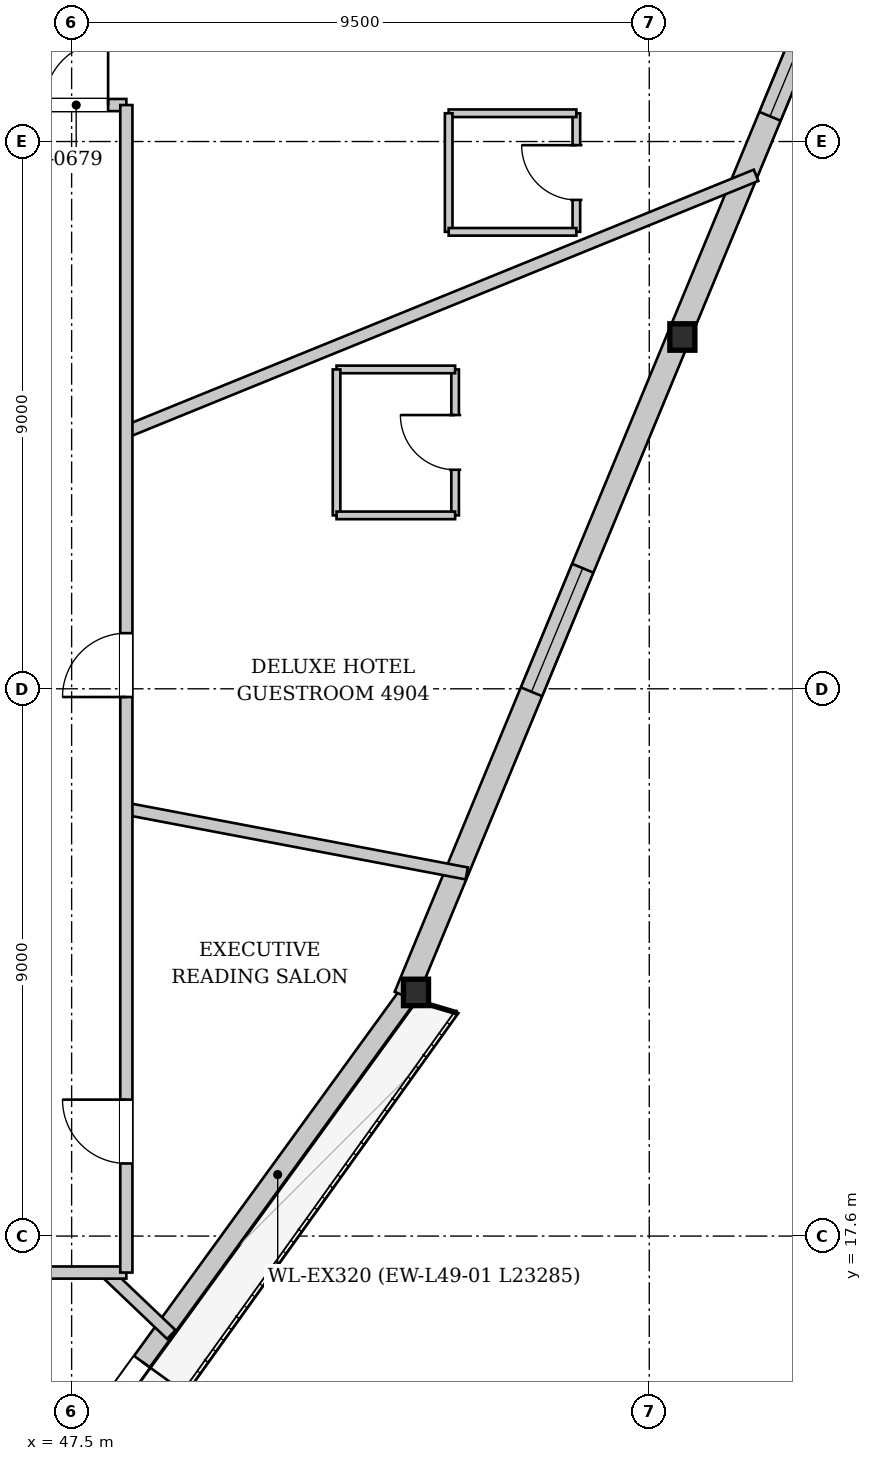
"""IFC4 building model, lengths in metres.
Left out: names, types, materials, properties, quantities, classifications, styles, units other than length and angle.
Written with IfcOpenShell. Run it as: python <this file> out.ifc"""

import sys

from ifc_helpers import new_model, si_unit, direction, frame, frame_2d, origin, origin_2d, place, context, subcontext, project, spatial, rectangle, i_section, extrude, source, transform, mapped, element, fill, save


model = new_model("IFC4")
c1 = context("Model", 3, precision=1e-05, world=origin(), true_north=direction((0.0, 1.0)))
c2 = subcontext(c1, "Body", "Model", "MODEL_VIEW")
j1 = project(units=[si_unit("LENGTHUNIT", "METRE"), si_unit("PLANEANGLEUNIT", "RADIAN")], contexts=[c1])
p1 = place(None, origin())
s1 = spatial("IfcSite", under=j1, at=p1, CompositionType="ELEMENT")
p2 = place(p1, origin())
s2 = spatial("IfcBuilding", under=s1, at=p2, CompositionType="ELEMENT")
p3 = place(p2, frame((0.0, 0.0, 185.65)))
s3 = spatial("IfcBuildingStorey", under=s2, at=p3, CompositionType="ELEMENT", Elevation=185.65)
m1 = source(origin(), c2, "Body", "SweptSolid", [
    extrude(i_section(OverallWidth=0.412, OverallDepth=0.435, WebThickness=0.031, FlangeThickness=0.05, at=origin_2d()), origin(), (0.0, 0.0, 1.0), 3.396),
])
p4 = place(p3, frame((53.164, 21.471, 0.0), z_axis=(0.0, 0.080230966511, 0.996776299885), x_axis=(-1.0, 0.0, 0.0)))
e1 = element("IfcColumn", 1, at=p4, inside=s3, PredefinedType="COLUMN", context=c2, shape_type="MappedRepresentation", body=[
    mapped(m1, transform((0.0, 0.0, 0.0), x_axis=(1.0, 0.0, 0.0), y_axis=(0.0, 1.0, 0.0), z_axis=(0.0, 0.0, 1.0), scale=1.0)),
])
m2 = source(origin(), c2, "Body", "SweptSolid", [
    extrude(i_section(OverallWidth=0.412, OverallDepth=0.435, WebThickness=0.031, FlangeThickness=0.05, at=origin_2d()), origin(), (0.0, 0.0, 1.0), 3.403),
])
p5 = place(p3, frame((57.621, 32.226, 0.0), z_axis=(-0.045049424917, 0.093470383228, 0.99460235108), x_axis=(-0.900831457079, -0.434168960127, 0.0)))
e2 = element("IfcColumn", 2, at=p5, inside=s3, PredefinedType="COLUMN", context=c2, shape_type="MappedRepresentation", body=[
    mapped(m2, transform((0.0, 0.0, 0.0), x_axis=(1.0, 0.0, 0.0), y_axis=(0.0, 1.0, 0.0), z_axis=(0.0, 0.0, 1.0), scale=1.0)),
])
p6 = place(p3, frame((53.034, 21.565, 0.0), z_axis=(0.0, 0.0, 1.0), x_axis=(-0.58764790483, -0.809116765337, 0.0)))
e3 = element("IfcWall", 3, at=p6, inside=s3, PredefinedType="SOLIDWALL", context=c2, shape_type="SweptSolid", body=[
    extrude(rectangle(XDim=23.285, YDim=0.32, at=frame_2d((11.643, 0.0))), origin(), (0.0, 0.0, 1.0), 2.722),
])
p7 = place(p6, frame((7.451, 0.0, 0.0)))
e4 = element("IfcOpeningElement", 4, at=p7, cuts=e3, PredefinedType="OPENING", context=c2, shape_type="SweptSolid", body=[
    extrude(rectangle(XDim=1.5, YDim=2.3, at=frame_2d((0.75, 1.15))), frame((0.0, 0.17, 0.0), z_axis=(0.0, -1.0, 0.0), x_axis=(1.0, 0.0, 0.0)), (0.0, 0.0, 1.0), 0.34),
])
p8 = place(p6, frame((14.331, 0.0, 0.252)))
e5 = element("IfcOpeningElement", 5, at=p8, cuts=e3, PredefinedType="OPENING", context=c2, shape_type="SweptSolid", body=[
    extrude(rectangle(XDim=2.6, YDim=2.35, at=frame_2d((1.3, 1.175))), frame((0.0, 0.17, 0.0), z_axis=(0.0, -1.0, 0.0), x_axis=(1.0, 0.0, 0.0)), (0.0, 0.0, 1.0), 0.34),
])
p9 = place(p3, frame((61.903, 43.055, 0.0), z_axis=(0.0, 0.0, 1.0), x_axis=(-0.382868163496, -0.923802992732, 0.0)))
e6 = element("IfcWall", 6, at=p9, inside=s3, PredefinedType="SOLIDWALL", context=c2, shape_type="SweptSolid", body=[
    extrude(rectangle(XDim=23.285, YDim=0.38, at=frame_2d((11.643, 0.0))), origin(), (0.0, 0.0, 1.0), 2.722),
])
p10 = place(p9, frame((5.42, 0.0, 0.352)))
e7 = element("IfcOpeningElement", 7, at=p10, cuts=e6, PredefinedType="OPENING", context=c2, shape_type="SweptSolid", body=[
    extrude(rectangle(XDim=2.2, YDim=2.25, at=frame_2d((1.1, 1.125))), frame((0.0, 0.2, 0.0), z_axis=(0.0, -1.0, 0.0), x_axis=(1.0, 0.0, 0.0)), (0.0, 0.0, 1.0), 0.4),
])
p11 = place(p9, frame((15.665, 0.0, 0.352)))
e8 = element("IfcOpeningElement", 8, at=p11, cuts=e6, PredefinedType="OPENING", context=c2, shape_type="SweptSolid", body=[
    extrude(rectangle(XDim=2.2, YDim=2.25, at=frame_2d((1.1, 1.125))), frame((0.0, 0.2, 0.0), z_axis=(0.0, -1.0, 0.0), x_axis=(1.0, 0.0, 0.0)), (0.0, 0.0, 1.0), 0.4),
])
p12 = place(p3, frame((48.07, 17.0, 0.0), z_axis=(0.0, 0.0, 1.0), x_axis=(0.723764420098, -0.69004714636, 0.0)))
e9 = element("IfcWall", 9, at=p12, inside=s3, PredefinedType="PARTITIONING", context=c2, shape_type="SweptSolid", body=[
    extrude(rectangle(XDim=1.477, YDim=0.2, at=frame_2d((0.739, 0.0))), origin(), (0.0, 0.0, 1.0), 3.33),
])
p13 = place(p3, frame((48.4, 24.626, 0.0), z_axis=(0.0, 0.0, 1.0), x_axis=(0.982464340051, -0.186450584681, 0.0)))
e10 = element("IfcWall", 10, at=p13, inside=s3, PredefinedType="PARTITIONING", context=c2, shape_type="SweptSolid", body=[
    extrude(rectangle(XDim=5.698, YDim=0.2, at=frame_2d((2.849, 0.0))), origin(), (0.0, 0.0, 1.0), 3.33),
])
p14 = place(p3, frame((48.4, 30.831, 0.0), z_axis=(0.0, 0.0, 1.0), x_axis=(0.926275636958, 0.376846712042, 0.0)))
e11 = element("IfcWall", 11, at=p14, inside=s3, PredefinedType="PARTITIONING", context=c2, shape_type="SweptSolid", body=[
    extrude(rectangle(XDim=11.181, YDim=0.2, at=frame_2d((5.591, 0.0))), origin(), (0.0, 0.0, 1.0), 3.33),
])
p15 = place(p3, frame((44.716, 36.2, 0.0), z_axis=(0.0, 0.0, 1.0), x_axis=(0.573232775322, 0.819392570931, 0.0)))
e12 = element("IfcWall", 12, at=p15, inside=s3, PredefinedType="PARTITIONING", context=c2, shape_type="SweptSolid", body=[
    extrude(rectangle(XDim=9.993, YDim=0.2, at=frame_2d((4.997, 0.0))), origin(), (0.0, 0.0, 1.0), 3.33),
])
p16 = place(p3, frame((53.807, 29.452, 0.0), z_axis=(0.0, 0.0, 1.0), x_axis=(0.0, 1.0, 0.0)))
e13 = element("IfcWall", 13, at=p16, inside=s3, PredefinedType="PARTITIONING", context=c2, shape_type="SweptSolid", body=[
    extrude(rectangle(XDim=2.4, YDim=0.125, at=frame_2d((1.2, 0.0))), origin(), (0.0, 0.0, 1.0), 3.33),
])
p17 = place(p16, frame((0.75, 0.0, 0.0)))
e14 = element("IfcOpeningElement", 14, at=p17, cuts=e13, PredefinedType="OPENING", context=c2, shape_type="SweptSolid", body=[
    extrude(rectangle(XDim=0.9, YDim=2.1, at=frame_2d((0.45, 1.05))), frame((0.0, 0.073, 0.0), z_axis=(0.0, -1.0, 0.0), x_axis=(1.0, 0.0, 0.0)), (0.0, 0.0, 1.0), 0.145),
])
p18 = place(p3, frame((53.807, 31.852, 0.0), z_axis=(0.0, 0.0, 1.0), x_axis=(-1.0, 0.0, 0.0)))
e15 = element("IfcWall", 15, at=p18, inside=s3, PredefinedType="PARTITIONING", context=c2, shape_type="SweptSolid", body=[
    extrude(rectangle(XDim=1.95, YDim=0.125, at=frame_2d((0.975, 0.0))), origin(), (0.0, 0.0, 1.0), 3.33),
])
p19 = place(p3, frame((51.857, 31.852, 0.0), z_axis=(0.0, 0.0, 1.0), x_axis=(0.0, -1.0, 0.0)))
e16 = element("IfcWall", 16, at=p19, inside=s3, PredefinedType="PARTITIONING", context=c2, shape_type="SweptSolid", body=[
    extrude(rectangle(XDim=2.4, YDim=0.125, at=frame_2d((1.2, 0.0))), origin(), (0.0, 0.0, 1.0), 3.33),
])
p20 = place(p3, frame((51.857, 29.452, 0.0), z_axis=(0.0, 0.0, 1.0), x_axis=(1.0, 0.0, 0.0)))
e17 = element("IfcWall", 17, at=p20, inside=s3, PredefinedType="PARTITIONING", context=c2, shape_type="SweptSolid", body=[
    extrude(rectangle(XDim=1.95, YDim=0.125, at=frame_2d((0.975, 0.0))), origin(), (0.0, 0.0, 1.0), 3.33),
])
p21 = place(p3, frame((55.801, 34.115, 0.0), z_axis=(0.0, 0.0, 1.0), x_axis=(0.0, 1.0, 0.0)))
e18 = element("IfcWall", 18, at=p21, inside=s3, PredefinedType="PARTITIONING", context=c2, shape_type="SweptSolid", body=[
    extrude(rectangle(XDim=1.95, YDim=0.125, at=frame_2d((0.975, 0.0))), origin(), (0.0, 0.0, 1.0), 3.33),
])
p22 = place(p21, frame((0.525, 0.0, 0.0)))
e19 = element("IfcOpeningElement", 19, at=p22, cuts=e18, PredefinedType="OPENING", context=c2, shape_type="SweptSolid", body=[
    extrude(rectangle(XDim=0.9, YDim=2.1, at=frame_2d((0.45, 1.05))), frame((0.0, 0.073, 0.0), z_axis=(0.0, -1.0, 0.0), x_axis=(1.0, 0.0, 0.0)), (0.0, 0.0, 1.0), 0.145),
])
p23 = place(p3, frame((55.801, 36.065, 0.0), z_axis=(0.0, 0.0, 1.0), x_axis=(-1.0, 0.0, 0.0)))
e20 = element("IfcWall", 20, at=p23, inside=s3, PredefinedType="PARTITIONING", context=c2, shape_type="SweptSolid", body=[
    extrude(rectangle(XDim=2.1, YDim=0.125, at=frame_2d((1.05, 0.0))), origin(), (0.0, 0.0, 1.0), 3.33),
])
p24 = place(p3, frame((53.701, 36.065, 0.0), z_axis=(0.0, 0.0, 1.0), x_axis=(0.0, -1.0, 0.0)))
e21 = element("IfcWall", 21, at=p24, inside=s3, PredefinedType="PARTITIONING", context=c2, shape_type="SweptSolid", body=[
    extrude(rectangle(XDim=1.95, YDim=0.125, at=frame_2d((0.975, 0.0))), origin(), (0.0, 0.0, 1.0), 3.33),
])
p25 = place(p3, frame((53.701, 34.115, 0.0), z_axis=(0.0, 0.0, 1.0), x_axis=(1.0, 0.0, 0.0)))
e22 = element("IfcWall", 22, at=p25, inside=s3, PredefinedType="PARTITIONING", context=c2, shape_type="SweptSolid", body=[
    extrude(rectangle(XDim=2.1, YDim=0.125, at=frame_2d((1.05, 0.0))), origin(), (0.0, 0.0, 1.0), 3.33),
])
p26 = place(p3, frame((27.6, 17.0, 0.0), z_axis=(0.0, 0.0, 1.0), x_axis=(1.0, 0.0, 0.0)))
e23 = element("IfcWall", 23, at=p26, inside=s3, PredefinedType="PARTITIONING", context=c2, shape_type="SweptSolid", body=[
    extrude(rectangle(XDim=20.8, YDim=0.2, at=frame_2d((10.4, 0.0))), origin(), (0.0, 0.0, 1.0), 3.33),
])
p27 = place(p26, frame((8.292, 0.0, 0.0)))
e24 = element("IfcOpeningElement", 24, at=p27, cuts=e23, PredefinedType="OPENING", context=c2, shape_type="SweptSolid", body=[
    extrude(rectangle(XDim=1.05, YDim=2.2, at=frame_2d((0.525, 1.1))), frame((0.0, 0.11, 0.0), z_axis=(0.0, -1.0, 0.0), x_axis=(1.0, 0.0, 0.0)), (0.0, 0.0, 1.0), 0.22),
])
p28 = place(p26, frame((15.097, 0.0, 0.0)))
e25 = element("IfcOpeningElement", 25, at=p28, cuts=e23, PredefinedType="OPENING", context=c2, shape_type="SweptSolid", body=[
    extrude(rectangle(XDim=1.05, YDim=2.2, at=frame_2d((0.525, 1.1))), frame((0.0, 0.11, 0.0), z_axis=(0.0, -1.0, 0.0), x_axis=(1.0, 0.0, 0.0)), (0.0, 0.0, 1.0), 0.22),
])
p29 = place(p26, frame((1.25, 0.0, 0.0)))
e26 = element("IfcOpeningElement", 26, at=p29, cuts=e23, PredefinedType="OPENING", context=c2, shape_type="SweptSolid", body=[
    extrude(rectangle(XDim=1.05, YDim=2.2, at=frame_2d((0.525, 1.1))), frame((0.0, 0.11, 0.0), z_axis=(0.0, -1.0, 0.0), x_axis=(1.0, 0.0, 0.0)), (0.0, 0.0, 1.0), 0.22),
])
p30 = place(p3, frame((43.4, 36.2, 0.0), z_axis=(0.0, 0.0, 1.0), x_axis=(1.0, 0.0, 0.0)))
e27 = element("IfcWall", 27, at=p30, inside=s3, PredefinedType="PARTITIONING", context=c2, shape_type="SweptSolid", body=[
    extrude(rectangle(XDim=5.0, YDim=0.2, at=frame_2d((2.5, 0.0))), origin(), (0.0, 0.0, 1.0), 3.33),
])
p31 = place(p30, frame((3.65, 0.0, 0.0)))
e28 = element("IfcOpeningElement", 28, at=p31, cuts=e27, PredefinedType="OPENING", context=c2, shape_type="SweptSolid", body=[
    extrude(rectangle(XDim=1.05, YDim=2.2, at=frame_2d((0.525, 1.1))), frame((0.0, 0.11, 0.0), z_axis=(0.0, -1.0, 0.0), x_axis=(1.0, 0.0, 0.0)), (0.0, 0.0, 1.0), 0.22),
])
p32 = place(p3, frame((48.4, 17.0, 0.0), z_axis=(0.0, 0.0, 1.0), x_axis=(0.0, 1.0, 0.0)))
e29 = element("IfcWall", 29, at=p32, inside=s3, PredefinedType="PARTITIONING", context=c2, shape_type="SweptSolid", body=[
    extrude(rectangle(XDim=19.2, YDim=0.2, at=frame_2d((9.6, 0.0))), origin(), (0.0, 0.0, 1.0), 3.33),
])
p33 = place(p32, frame((1.794, 0.0, 0.0)))
e30 = element("IfcOpeningElement", 30, at=p33, cuts=e29, PredefinedType="OPENING", context=c2, shape_type="SweptSolid", body=[
    extrude(rectangle(XDim=1.05, YDim=2.2, at=frame_2d((0.525, 1.1))), frame((0.0, 0.11, 0.0), z_axis=(0.0, -1.0, 0.0), x_axis=(1.0, 0.0, 0.0)), (0.0, 0.0, 1.0), 0.22),
])
p34 = place(p32, frame((9.465, 0.0, 0.0)))
e31 = element("IfcOpeningElement", 31, at=p34, cuts=e29, PredefinedType="OPENING", context=c2, shape_type="SweptSolid", body=[
    extrude(rectangle(XDim=1.05, YDim=2.2, at=frame_2d((0.525, 1.1))), frame((0.0, 0.11, 0.0), z_axis=(0.0, -1.0, 0.0), x_axis=(1.0, 0.0, 0.0)), (0.0, 0.0, 1.0), 0.22),
])
m3 = source(origin(), c2, "Body", "SweptSolid", [
    extrude(rectangle(XDim=1.5, YDim=2.3, at=frame_2d((0.75, 1.15))), frame((0.0, 0.025, 0.0), z_axis=(0.0, -1.0, 0.0), x_axis=(1.0, 0.0, 0.0)), (0.0, 0.0, 1.0), 0.05),
])
p35 = place(p7, origin())
e32 = element("IfcDoor", 32, at=p35, inside=s3, OperationType="DOUBLE_DOOR_SINGLE_SWING", PredefinedType="DOOR", context=c2, shape_type="MappedRepresentation", body=[
    mapped(m3, transform((0.0, 0.0, 0.0), x_axis=(1.0, 0.0, 0.0), y_axis=(0.0, 1.0, 0.0), z_axis=(0.0, 0.0, 1.0), scale=1.0)),
])
fill(e4, e32)
m4 = source(origin(), c2, "Body", "SweptSolid", [
    extrude(rectangle(XDim=2.2, YDim=2.25, at=frame_2d((1.1, 1.125))), frame((0.0, 0.03, 0.0), z_axis=(0.0, -1.0, 0.0), x_axis=(1.0, 0.0, 0.0)), (0.0, 0.0, 1.0), 0.06),
])
p36 = place(p10, origin())
e33 = element("IfcWindow", 33, at=p36, inside=s3, PartitioningType="SINGLE_PANEL", PredefinedType="WINDOW", context=c2, shape_type="MappedRepresentation", body=[
    mapped(m4, transform((0.0, 0.0, 0.0), x_axis=(1.0, 0.0, 0.0), y_axis=(0.0, 1.0, 0.0), z_axis=(0.0, 0.0, 1.0), scale=1.0)),
])
fill(e7, e33)
p37 = place(p11, origin())
e34 = element("IfcWindow", 34, at=p37, inside=s3, PartitioningType="SINGLE_PANEL", PredefinedType="WINDOW", context=c2, shape_type="MappedRepresentation", body=[
    mapped(m4, transform((0.0, 0.0, 0.0), x_axis=(1.0, 0.0, 0.0), y_axis=(0.0, 1.0, 0.0), z_axis=(0.0, 0.0, 1.0), scale=1.0)),
])
fill(e8, e34)
m5 = source(origin(), c2, "Body", "SweptSolid", [
    extrude(rectangle(XDim=0.9, YDim=2.1, at=frame_2d((0.45, 1.05))), frame((0.0, 0.025, 0.0), z_axis=(0.0, -1.0, 0.0), x_axis=(1.0, 0.0, 0.0)), (0.0, 0.0, 1.0), 0.05),
])
p38 = place(p17, origin())
e35 = element("IfcDoor", 35, at=p38, inside=s3, OperationType="SINGLE_SWING_RIGHT", PredefinedType="DOOR", context=c2, shape_type="MappedRepresentation", body=[
    mapped(m5, transform((0.0, 0.0, 0.0), x_axis=(1.0, 0.0, 0.0), y_axis=(0.0, 1.0, 0.0), z_axis=(0.0, 0.0, 1.0), scale=1.0)),
])
fill(e14, e35)
p39 = place(p22, origin())
e36 = element("IfcDoor", 36, at=p39, inside=s3, OperationType="SINGLE_SWING_RIGHT", PredefinedType="DOOR", context=c2, shape_type="MappedRepresentation", body=[
    mapped(m5, transform((0.0, 0.0, 0.0), x_axis=(1.0, 0.0, 0.0), y_axis=(0.0, 1.0, 0.0), z_axis=(0.0, 0.0, 1.0), scale=1.0)),
])
fill(e19, e36)
m6 = source(origin(), c2, "Body", "SweptSolid", [
    extrude(rectangle(XDim=1.05, YDim=2.2, at=frame_2d((0.525, 1.1))), frame((0.0, 0.025, 0.0), z_axis=(0.0, -1.0, 0.0), x_axis=(1.0, 0.0, 0.0)), (0.0, 0.0, 1.0), 0.05),
])
p40 = place(p31, origin())
e37 = element("IfcDoor", 37, at=p40, inside=s3, OperationType="SINGLE_SWING_RIGHT", PredefinedType="DOOR", context=c2, shape_type="MappedRepresentation", body=[
    mapped(m6, transform((0.0, 0.0, 0.0), x_axis=(1.0, 0.0, 0.0), y_axis=(0.0, 1.0, 0.0), z_axis=(0.0, 0.0, 1.0), scale=1.0)),
])
fill(e28, e37)
p41 = place(p33, origin())
e38 = element("IfcDoor", 38, at=p41, inside=s3, OperationType="SINGLE_SWING_RIGHT", PredefinedType="DOOR", context=c2, shape_type="MappedRepresentation", body=[
    mapped(m6, transform((0.0, 0.0, 0.0), x_axis=(1.0, 0.0, 0.0), y_axis=(0.0, 1.0, 0.0), z_axis=(0.0, 0.0, 1.0), scale=1.0)),
])
fill(e30, e38)
p42 = place(p34, origin())
e39 = element("IfcDoor", 39, at=p42, inside=s3, OperationType="SINGLE_SWING_LEFT", PredefinedType="DOOR", context=c2, shape_type="MappedRepresentation", body=[
    mapped(m6, transform((0.0, 0.0, 0.0), x_axis=(1.0, 0.0, 0.0), y_axis=(0.0, 1.0, 0.0), z_axis=(0.0, 0.0, 1.0), scale=1.0)),
])
fill(e31, e39)
save(model, sys.argv[1])
